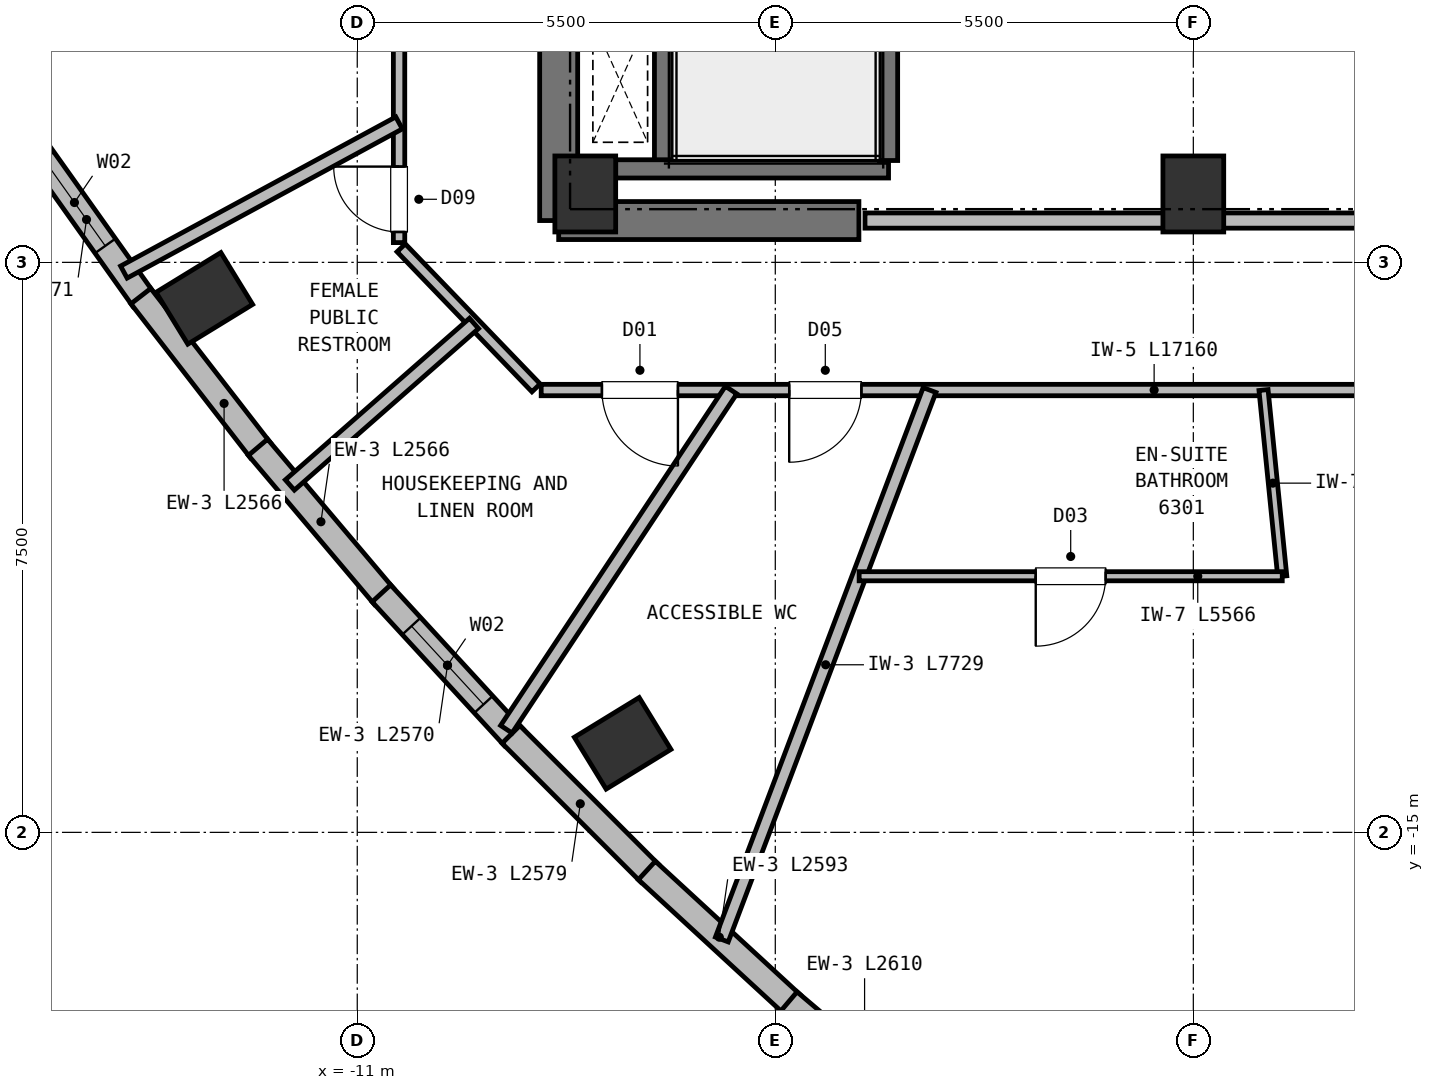
"""IFC4 building model, lengths in metres.
Left out: names, types, materials, properties, quantities, classifications, styles, units other than length and angle.
Written with IfcOpenShell. Run it as: python <this file> out.ifc"""

import sys

from ifc_helpers import new_model, si_unit, direction, frame, frame_2d, origin, origin_2d, place, context, subcontext, project, spatial, rectangle, extrude, element, fill, save


model = new_model("IFC4")
c1 = context("Model", 3, precision=1e-05, world=origin(), true_north=direction((0.0, 1.0)))
c2 = subcontext(c1, "Body", "Model", "MODEL_VIEW")
j1 = project(units=[si_unit("LENGTHUNIT", "METRE"), si_unit("PLANEANGLEUNIT", "RADIAN")], contexts=[c1])
p1 = place(None, origin())
s1 = spatial("IfcSite", under=j1, at=p1, CompositionType="ELEMENT")
p2 = place(p1, origin())
s2 = spatial("IfcBuilding", under=s1, at=p2, CompositionType="ELEMENT")
p3 = place(p2, frame((0.0, 0.0, 239.75)))
s3 = spatial("IfcBuildingStorey", under=s2, at=p3, CompositionType="ELEMENT", Elevation=239.75)
for number, where, z_axis, x_axis in (
    (1, (-8.0, -6.6, 0.0), (0.0, 0.0, 1.0), (1.0, 0.0, 0.0)),
    (2, (0.0, -6.6, 0.0), (0.0, 0.0, 1.0), (1.0, 0.0, 0.0)),
):
    element("IfcColumn", number, at=place(p3, frame(where, z_axis=z_axis, x_axis=x_axis)), inside=s3, PredefinedType="COLUMN", context=c2, shape_type="SweptSolid", body=[
        extrude(rectangle(XDim=0.8, YDim=1.0, at=origin_2d()), origin(), (0.0, 0.0, 1.0), 3.8),
    ])
p4 = place(p3, frame((-8.35, -6.95, 0.0), z_axis=(0.0, 0.0, 1.0), x_axis=(1.0, 0.0, 0.0)))
e3 = element("IfcWall", 3, at=p4, inside=s3, PredefinedType="SHEAR", context=c2, shape_type="SweptSolid", body=[
    extrude(rectangle(XDim=3.95, YDim=0.5, at=frame_2d((1.975, 0.0))), origin(), (0.0, 0.0, 1.0), 3.55),
])
p5 = place(p3, frame((-8.35, -6.95, 0.0), z_axis=(0.0, 0.0, 1.0), x_axis=(0.0, 1.0, 0.0)))
e4 = element("IfcWall", 4, at=p5, inside=s3, PredefinedType="SHEAR", context=c2, shape_type="SweptSolid", body=[
    extrude(rectangle(XDim=8.1, YDim=0.5, at=frame_2d((4.05, 0.0))), origin(), (0.0, 0.0, 1.0), 3.55),
])
for number, where, z_axis, x_axis in (
    (5, (-13.012, -7.974, 0.0), (0.0, 0.0, 1.0), (-0.522, 0.853, 0.0)),
    (6, (-7.508, -13.828, 0.0), (0.0, 0.0, 1.0), (-0.522, 0.853, 0.0)),
):
    element("IfcColumn", number, at=place(p3, frame(where, z_axis=z_axis, x_axis=x_axis)), inside=s3, PredefinedType="COLUMN", context=c2, shape_type="SweptSolid", body=[
        extrude(rectangle(XDim=0.8, YDim=1.0, at=origin_2d()), origin(), (0.0, 0.0, 1.0), 3.8),
    ])
p6 = place(p3, frame((-13.817, -7.984, 0.0), z_axis=(0.0, 0.0, 1.0), x_axis=(-0.579242009098, 0.815155626182, 0.0)))
e7 = element("IfcWall", 7, at=p6, inside=s3, PredefinedType="SOLIDWALL", context=c2, shape_type="SweptSolid", body=[
    extrude(rectangle(XDim=2.571, YDim=0.33, at=frame_2d((1.285, 0.0))), origin(), (0.0, 0.0, 1.0), 3.55),
])
p7 = place(p6, frame((0.86, 0.0, 0.72)))
e8 = element("IfcOpeningElement", 8, at=p7, cuts=e7, PredefinedType="OPENING", context=c2, shape_type="SweptSolid", body=[
    extrude(rectangle(XDim=1.4, YDim=1.84, at=frame_2d((0.7, 0.92))), frame((0.0, 0.175, 0.0), z_axis=(0.0, -1.0, 0.0), x_axis=(1.0, 0.0, 0.0)), (0.0, 0.0, 1.0), 0.35),
])
for number, where, z_axis, x_axis in (
    (9, (-12.275, -9.972, 0.0), (0.0, 0.0, 1.0), (-0.613, 0.79, 0.0)),
    (10, (-10.65, -11.893, 0.0), (0.0, 0.0, 1.0), (-0.645, 0.764, 0.0)),
):
    element("IfcWall", number, at=place(p3, frame(where, z_axis=z_axis, x_axis=x_axis)), inside=s3, PredefinedType="SOLIDWALL", context=c2, shape_type="SweptSolid", body=[
        extrude(rectangle(XDim=2.566, YDim=0.33, at=frame_2d((1.283, 0.0))), origin(), (0.0, 0.0, 1.0), 3.55),
    ])
p8 = place(p3, frame((-8.943, -13.748, 0.0), z_axis=(0.0, 0.0, 1.0), x_axis=(-0.676850734721, 0.736120291059, 0.0)))
e11 = element("IfcWall", 11, at=p8, inside=s3, PredefinedType="SOLIDWALL", context=c2, shape_type="SweptSolid", body=[
    extrude(rectangle(XDim=2.57, YDim=0.33, at=frame_2d((1.285, 0.0))), origin(), (0.0, 0.0, 1.0), 3.55),
])
p9 = place(p8, frame((0.585, 0.0, 0.72)))
e12 = element("IfcOpeningElement", 12, at=p9, cuts=e11, PredefinedType="OPENING", context=c2, shape_type="SweptSolid", body=[
    extrude(rectangle(XDim=1.4, YDim=1.84, at=frame_2d((0.7, 0.92))), frame((0.0, 0.175, 0.0), z_axis=(0.0, -1.0, 0.0), x_axis=(1.0, 0.0, 0.0)), (0.0, 0.0, 1.0), 0.35),
])
p10 = place(p3, frame((-7.154, -15.536, 0.0), z_axis=(0.0, 0.0, 1.0), x_axis=(-0.706917462112, 0.707296049587, 0.0)))
e13 = element("IfcWall", 13, at=p10, inside=s3, PredefinedType="SOLIDWALL", context=c2, shape_type="SweptSolid", body=[
    extrude(rectangle(XDim=2.58, YDim=0.33, at=frame_2d((1.29, 0.0))), origin(), (0.0, 0.0, 1.0), 3.55),
])
p11 = place(p3, frame((-5.283, -17.258, 0.0), z_axis=(0.0, 0.0, 1.0), x_axis=(-0.735561158646, 0.677458324837, 0.0)))
e14 = element("IfcWall", 14, at=p11, inside=s3, PredefinedType="SOLIDWALL", context=c2, shape_type="SweptSolid", body=[
    extrude(rectangle(XDim=2.593, YDim=0.33, at=frame_2d((1.296, 0.0))), origin(), (0.0, 0.0, 1.0), 3.55),
])
p12 = place(p3, frame((-3.33, -18.913, 0.0), z_axis=(0.0, 0.0, 1.0), x_axis=(-0.762587433163, 0.646885157336, 0.0)))
e15 = element("IfcWall", 15, at=p12, inside=s3, PredefinedType="SOLIDWALL", context=c2, shape_type="SweptSolid", body=[
    extrude(rectangle(XDim=2.61, YDim=0.33, at=frame_2d((1.305, 0.0))), origin(), (0.0, 0.0, 1.0), 3.55),
])
p13 = place(p12, frame((0.605, 0.0, 0.72)))
e16 = element("IfcOpeningElement", 16, at=p13, cuts=e15, PredefinedType="OPENING", context=c2, shape_type="SweptSolid", body=[
    extrude(rectangle(XDim=1.4, YDim=1.84, at=frame_2d((0.7, 0.92))), frame((0.0, 0.175, 0.0), z_axis=(0.0, -1.0, 0.0), x_axis=(1.0, 0.0, 0.0)), (0.0, 0.0, 1.0), 0.35),
])
p14 = place(p3, frame((-6.97, -6.16, 0.0), z_axis=(0.0, 0.0, 1.0), x_axis=(0.0, 1.0, 0.0)))
e17 = element("IfcWall", 17, at=p14, inside=s3, PredefinedType="SHEAR", context=c2, shape_type="SweptSolid", body=[
    extrude(rectangle(XDim=7.22, YDim=0.24, at=frame_2d((3.61, 0.0))), origin(), (0.0, 0.0, 1.0), 3.55),
])
p15 = place(p3, frame((-7.6, -6.27, 0.0), z_axis=(0.0, 0.0, 1.0), x_axis=(1.0, 0.0, 0.0)))
e18 = element("IfcWall", 18, at=p15, inside=s3, PredefinedType="SHEAR", context=c2, shape_type="SweptSolid", body=[
    extrude(rectangle(XDim=3.59, YDim=0.24, at=frame_2d((1.795, 0.0))), origin(), (0.0, 0.0, 1.0), 3.55),
])
p16 = place(p3, frame((-4.01, -6.16, 0.0), z_axis=(0.0, 0.0, 1.0), x_axis=(0.0, 1.0, 0.0)))
e19 = element("IfcWall", 19, at=p16, inside=s3, PredefinedType="SHEAR", context=c2, shape_type="SweptSolid", body=[
    extrude(rectangle(XDim=7.22, YDim=0.24, at=frame_2d((3.61, 0.0))), origin(), (0.0, 0.0, 1.0), 3.55),
])
p17 = place(p3, frame((-4.32, -6.95, 0.0), z_axis=(0.0, 0.0, 1.0), x_axis=(1.0, 0.0, 0.0)))
e20 = element("IfcWall", 20, at=p17, inside=s3, PredefinedType="PARTITIONING", context=c2, shape_type="SweptSolid", body=[
    extrude(rectangle(XDim=8.64, YDim=0.2, at=frame_2d((4.32, 0.0))), origin(), (0.0, 0.0, 1.0), 3.55),
])
p18 = place(p3, frame((8.58, -9.18, 0.0), z_axis=(0.0, 0.0, 1.0), x_axis=(-1.0, 0.0, 0.0)))
e21 = element("IfcWall", 21, at=p18, inside=s3, PredefinedType="PARTITIONING", context=c2, shape_type="SweptSolid", body=[
    extrude(rectangle(XDim=17.16, YDim=0.15, at=frame_2d((8.58, 0.0))), origin(), (0.0, 0.0, 1.0), 3.23),
])
p19 = place(p18, frame((15.361, 0.0, 0.0)))
e22 = element("IfcOpeningElement", 22, at=p19, cuts=e21, PredefinedType="OPENING", context=c2, shape_type="SweptSolid", body=[
    extrude(rectangle(XDim=1.0, YDim=2.15, at=frame_2d((0.5, 1.075))), frame((0.0, 0.085, 0.0), z_axis=(0.0, -1.0, 0.0), x_axis=(1.0, 0.0, 0.0)), (0.0, 0.0, 1.0), 0.17),
])
p20 = place(p18, frame((12.947, 0.0, 0.0)))
e23 = element("IfcOpeningElement", 23, at=p20, cuts=e21, PredefinedType="OPENING", context=c2, shape_type="SweptSolid", body=[
    extrude(rectangle(XDim=0.95, YDim=2.1, at=frame_2d((0.475, 1.05))), frame((0.0, 0.085, 0.0), z_axis=(0.0, -1.0, 0.0), x_axis=(1.0, 0.0, 0.0)), (0.0, 0.0, 1.0), 0.17),
])
p21 = place(p18, frame((4.184, 0.0, 0.0)))
e24 = element("IfcOpeningElement", 24, at=p21, cuts=e21, PredefinedType="OPENING", context=c2, shape_type="SweptSolid", body=[
    extrude(rectangle(XDim=1.06, YDim=2.15, at=frame_2d((0.53, 1.075))), frame((0.0, 0.085, 0.0), z_axis=(0.0, -1.0, 0.0), x_axis=(1.0, 0.0, 0.0)), (0.0, 0.0, 1.0), 0.17),
])
p22 = place(p3, frame((-10.45, -7.24, 0.0), z_axis=(0.0, 0.0, 1.0), x_axis=(0.0, 1.0, 0.0)))
e25 = element("IfcWall", 25, at=p22, inside=s3, PredefinedType="PARTITIONING", context=c2, shape_type="SweptSolid", body=[
    extrude(rectangle(XDim=14.48, YDim=0.15, at=frame_2d((7.24, 0.0))), origin(), (0.0, 0.0, 1.0), 3.23),
])
p23 = place(p22, frame((0.14, 0.0, 0.0)))
e26 = element("IfcOpeningElement", 26, at=p23, cuts=e25, PredefinedType="OPENING", context=c2, shape_type="SweptSolid", body=[
    extrude(rectangle(XDim=0.86, YDim=2.05, at=frame_2d((0.43, 1.025))), frame((0.0, 0.085, 0.0), z_axis=(0.0, -1.0, 0.0), x_axis=(1.0, 0.0, 0.0)), (0.0, 0.0, 1.0), 0.17),
])
p24 = place(p22, frame((4.973, 0.0, 0.0)))
e27 = element("IfcOpeningElement", 27, at=p24, cuts=e25, PredefinedType="OPENING", context=c2, shape_type="SweptSolid", body=[
    extrude(rectangle(XDim=1.0, YDim=2.15, at=frame_2d((0.5, 1.075))), frame((0.0, 0.085, 0.0), z_axis=(0.0, -1.0, 0.0), x_axis=(1.0, 0.0, 0.0)), (0.0, 0.0, 1.0), 0.17),
])
p25 = place(p22, frame((11.335, 0.0, 0.0)))
e28 = element("IfcOpeningElement", 28, at=p25, cuts=e25, PredefinedType="OPENING", context=c2, shape_type="SweptSolid", body=[
    extrude(rectangle(XDim=1.0, YDim=2.15, at=frame_2d((0.5, 1.075))), frame((0.0, 0.085, 0.0), z_axis=(0.0, -1.0, 0.0), x_axis=(1.0, 0.0, 0.0)), (0.0, 0.0, 1.0), 0.17),
])
p26 = place(p3, frame((-8.648, -9.151, 0.0), z_axis=(0.0, 0.0, 1.0), x_axis=(-0.693764562202, 0.720201869085, 0.0)))
e29 = element("IfcWall", 29, at=p26, inside=s3, PredefinedType="PARTITIONING", context=c2, shape_type="SweptSolid", body=[
    extrude(rectangle(XDim=2.558, YDim=0.15, at=frame_2d((1.279, 0.0))), origin(), (0.0, 0.0, 1.0), 3.23),
])
p27 = place(p3, frame((-3.47, -9.18, 0.0), z_axis=(0.0, 0.0, 1.0), x_axis=(-0.353618010817, -0.935389919994, 0.0)))
e30 = element("IfcWall", 30, at=p27, inside=s3, PredefinedType="PARTITIONING", context=c2, shape_type="SweptSolid", body=[
    extrude(rectangle(XDim=7.729, YDim=0.18, at=frame_2d((3.865, 0.0))), origin(), (0.0, 0.0, 1.0), 3.55),
])
p28 = place(p3, frame((0.924, -9.18, 0.0), z_axis=(0.0, 0.0, 1.0), x_axis=(0.100043637061, -0.99498305045, 0.0)))
e31 = element("IfcWall", 31, at=p28, inside=s3, PredefinedType="PARTITIONING", context=c2, shape_type="SweptSolid", body=[
    extrude(rectangle(XDim=2.462, YDim=0.12, at=frame_2d((1.231, 0.0))), origin(), (0.0, 0.0, 1.0), 3.55),
])
p29 = place(p3, frame((1.17, -11.63, 0.0), z_axis=(0.0, 0.0, 1.0), x_axis=(-1.0, 0.0, 0.0)))
e32 = element("IfcWall", 32, at=p29, inside=s3, PredefinedType="PARTITIONING", context=c2, shape_type="SweptSolid", body=[
    extrude(rectangle(XDim=5.566, YDim=0.12, at=frame_2d((2.783, 0.0))), origin(), (0.0, 0.0, 1.0), 3.23),
])
p30 = place(p29, frame((2.323, 0.0, 0.0)))
e33 = element("IfcOpeningElement", 33, at=p30, cuts=e32, PredefinedType="OPENING", context=c2, shape_type="SweptSolid", body=[
    extrude(rectangle(XDim=0.92, YDim=2.1, at=frame_2d((0.46, 1.05))), frame((0.0, 0.07, 0.0), z_axis=(0.0, -1.0, 0.0), x_axis=(1.0, 0.0, 0.0)), (0.0, 0.0, 1.0), 0.14),
])
p31 = place(p3, frame((-10.45, -5.665, 0.0), z_axis=(0.0, 0.0, 1.0), x_axis=(-0.879154356789, -0.476537109718, 0.0)))
e34 = element("IfcWall", 34, at=p31, inside=s3, PredefinedType="PARTITIONING", context=c2, shape_type="SweptSolid", body=[
    extrude(rectangle(XDim=4.119, YDim=0.18, at=frame_2d((2.059, 0.0))), origin(), (0.0, 0.0, 1.0), 3.55),
])
p32 = place(p3, frame((-9.464, -8.304, 0.0), z_axis=(0.0, 0.0, 1.0), x_axis=(-0.751698496635, -0.659506914411, 0.0)))
e35 = element("IfcWall", 35, at=p32, inside=s3, PredefinedType="PARTITIONING", context=c2, shape_type="SweptSolid", body=[
    extrude(rectangle(XDim=3.223, YDim=0.18, at=frame_2d((1.611, 0.0))), origin(), (0.0, 0.0, 1.0), 3.55),
])
p33 = place(p3, frame((-6.082, -9.18, 0.0), z_axis=(0.0, 0.0, 1.0), x_axis=(-0.552266974528, -0.833667313048, 0.0)))
e36 = element("IfcWall", 36, at=p33, inside=s3, PredefinedType="PARTITIONING", context=c2, shape_type="SweptSolid", body=[
    extrude(rectangle(XDim=5.354, YDim=0.18, at=frame_2d((2.677, 0.0))), origin(), (0.0, 0.0, 1.0), 3.55),
])
p34 = place(p7, origin())
e37 = element("IfcWindow", 37, at=p34, inside=s3, PartitioningType="SINGLE_PANEL", PredefinedType="WINDOW", context=c2, shape_type="SweptSolid", body=[
    extrude(rectangle(XDim=1.4, YDim=1.84, at=frame_2d((0.7, 0.92))), frame((0.0, 0.03, 0.0), z_axis=(0.0, -1.0, 0.0), x_axis=(1.0, 0.0, 0.0)), (0.0, 0.0, 1.0), 0.06),
])
fill(e8, e37)
p35 = place(p9, origin())
e38 = element("IfcWindow", 38, at=p35, inside=s3, PartitioningType="SINGLE_PANEL", PredefinedType="WINDOW", context=c2, shape_type="SweptSolid", body=[
    extrude(rectangle(XDim=1.4, YDim=1.84, at=frame_2d((0.7, 0.92))), frame((0.0, 0.03, 0.0), z_axis=(0.0, -1.0, 0.0), x_axis=(1.0, 0.0, 0.0)), (0.0, 0.0, 1.0), 0.06),
])
fill(e12, e38)
p36 = place(p30, origin())
e39 = element("IfcDoor", 39, at=p36, inside=s3, OperationType="SINGLE_SWING_RIGHT", PredefinedType="DOOR", context=c2, shape_type="SweptSolid", body=[
    extrude(rectangle(XDim=0.92, YDim=2.1, at=frame_2d((0.46, 1.05))), frame((0.0, 0.025, 0.0), z_axis=(0.0, -1.0, 0.0), x_axis=(1.0, 0.0, 0.0)), (0.0, 0.0, 1.0), 0.05),
])
fill(e33, e39)
p37 = place(p23, origin())
e40 = element("IfcDoor", 40, at=p37, inside=s3, OperationType="SINGLE_SWING_RIGHT", PredefinedType="DOOR", context=c2, shape_type="SweptSolid", body=[
    extrude(rectangle(XDim=0.86, YDim=2.05, at=frame_2d((0.43, 1.025))), frame((0.0, 0.025, 0.0), z_axis=(0.0, -1.0, 0.0), x_axis=(1.0, 0.0, 0.0)), (0.0, 0.0, 1.0), 0.05),
])
fill(e26, e40)
p38 = place(p19, origin())
e41 = element("IfcDoor", 41, at=p38, inside=s3, OperationType="SINGLE_SWING_LEFT", PredefinedType="DOOR", context=c2, shape_type="SweptSolid", body=[
    extrude(rectangle(XDim=1.0, YDim=2.15, at=frame_2d((0.5, 1.075))), frame((0.0, 0.025, 0.0), z_axis=(0.0, -1.0, 0.0), x_axis=(1.0, 0.0, 0.0)), (0.0, 0.0, 1.0), 0.05),
])
fill(e22, e41)
p39 = place(p20, origin())
e42 = element("IfcDoor", 42, at=p39, inside=s3, OperationType="SINGLE_SWING_RIGHT", PredefinedType="DOOR", context=c2, shape_type="SweptSolid", body=[
    extrude(rectangle(XDim=0.95, YDim=2.1, at=frame_2d((0.475, 1.05))), frame((0.0, 0.025, 0.0), z_axis=(0.0, -1.0, 0.0), x_axis=(1.0, 0.0, 0.0)), (0.0, 0.0, 1.0), 0.05),
])
fill(e23, e42)
save(model, sys.argv[1])
